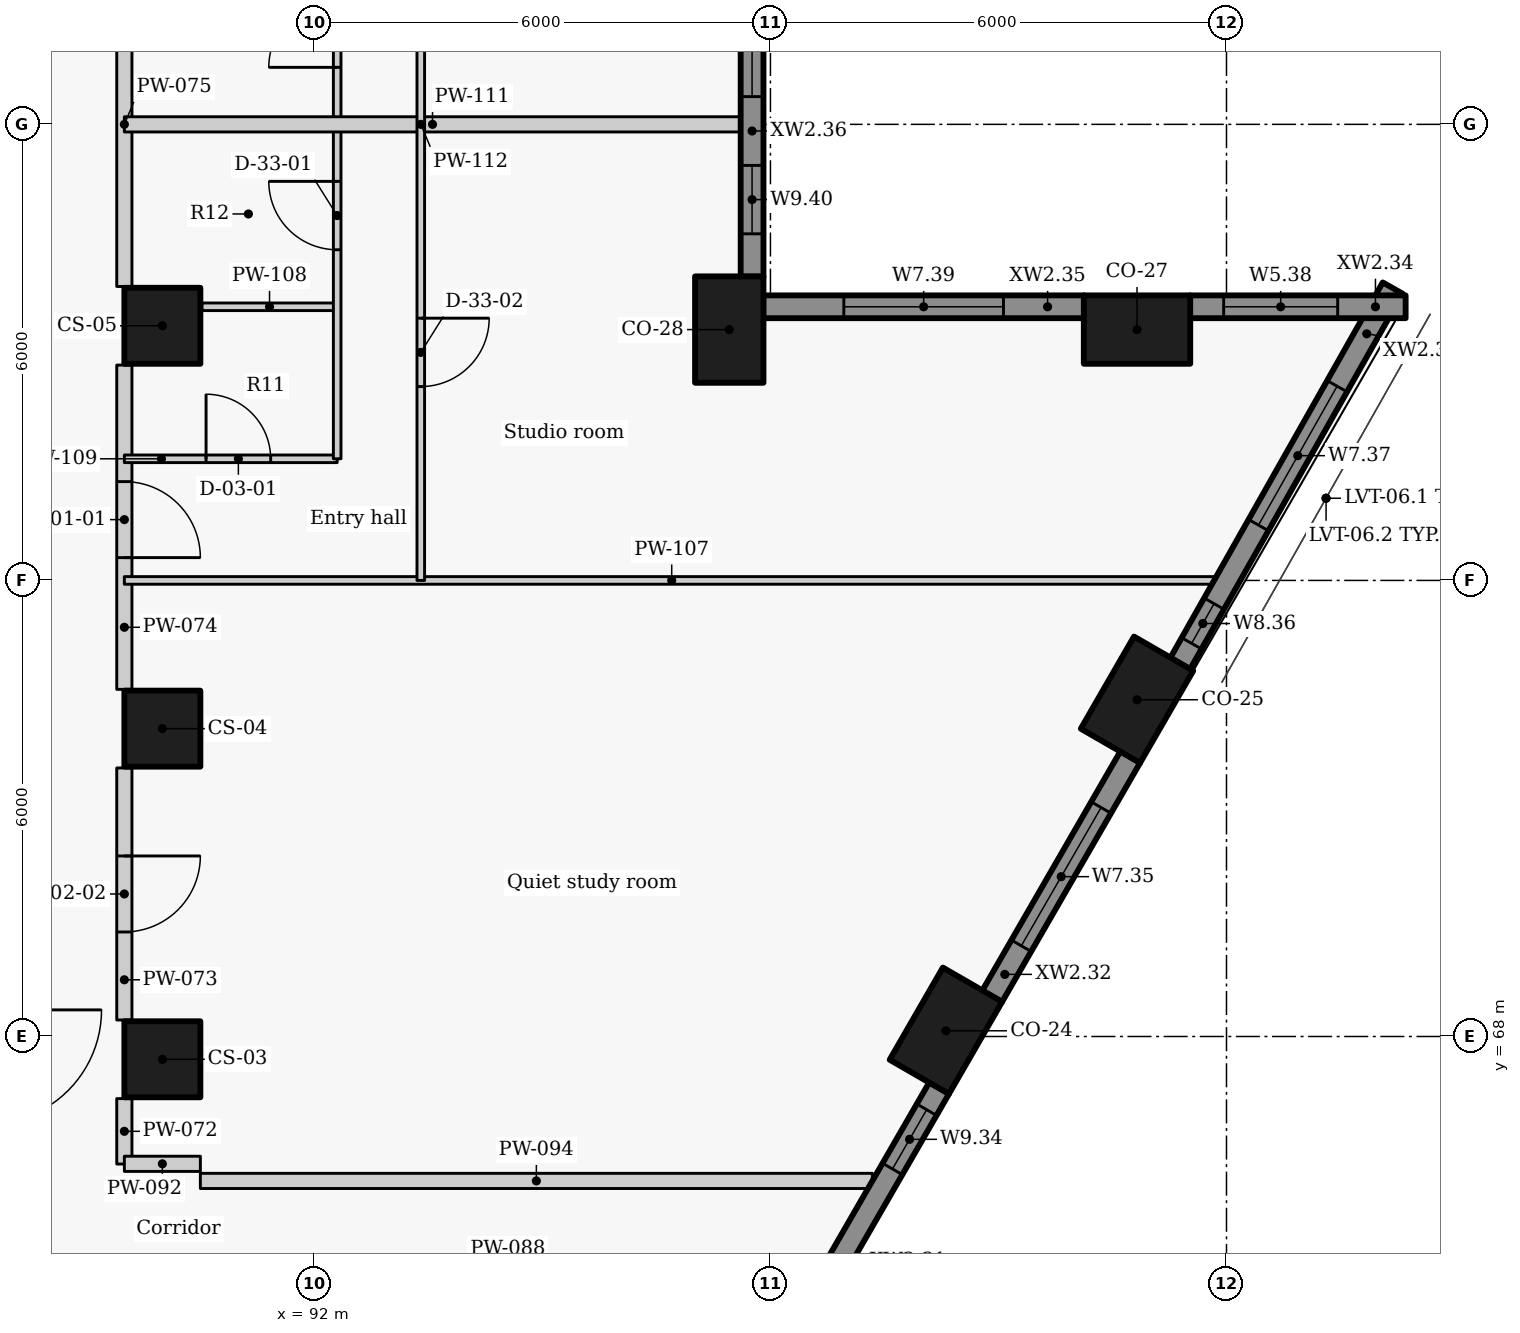
"""IFC4 building model, lengths in metres.
Left out: names, types, materials, properties, quantities, classifications, styles, units other than length and angle.
Written with IfcOpenShell. Run it as: python <this file> out.ifc"""

import sys

from ifc_helpers import new_model, si_unit, direction, frame, frame_2d, origin, origin_2d, place, context, subcontext, project, spatial, rectangle, extrude, element, fill, save


model = new_model("IFC4")
c1 = context("Model", 3, precision=1e-05, world=origin(), true_north=direction((0.0, 1.0)))
c2 = subcontext(c1, "Body", "Model", "MODEL_VIEW")
j1 = project(units=[si_unit("LENGTHUNIT", "METRE"), si_unit("PLANEANGLEUNIT", "RADIAN")], contexts=[c1])
p1 = place(None, origin())
s1 = spatial("IfcSite", under=j1, at=p1, CompositionType="ELEMENT")
p2 = place(p1, origin())
s2 = spatial("IfcBuilding", under=s1, at=p2, CompositionType="ELEMENT")
p3 = place(p2, frame((0.0, 0.0, 87.6)))
s3 = spatial("IfcBuildingStorey", under=s2, at=p3, CompositionType="ELEMENT", Elevation=87.6)
for number, where, z_axis, x_axis in (
    (1, (100.308, 68.075, 0.0), (0.0, 0.0, 1.0), (0.5, 0.866, 0.0)),
    (2, (102.823, 72.43, 0.0), (0.0, 0.0, 1.0), (0.5, 0.866, 0.0)),
    (3, (102.823, 77.3, 0.0), (0.0, 0.0, 1.0), (-1.0, 0.0, 0.0)),
    (4, (97.458, 77.3, 0.0), (0.0, 0.0, 1.0), (0.0, 1.0, 0.0)),
):
    element("IfcColumn", number, at=place(p3, frame(where, z_axis=z_axis, x_axis=x_axis)), inside=s3, PredefinedType="COLUMN", context=c2, shape_type="SweptSolid", body=[
        extrude(rectangle(XDim=1.4, YDim=0.9, at=origin_2d()), origin(), (0.0, 0.0, 1.0), 3.3),
    ])
for number, where, z_axis, x_axis in (
    (5, (90.0, 67.7, 0.0), (0.0, 0.0, 1.0), (0.0, 1.0, 0.0)),
    (6, (90.0, 72.05, 0.0), (0.0, 0.0, 1.0), (0.0, 1.0, 0.0)),
    (7, (90.0, 77.35, 0.0), (0.0, 0.0, 1.0), (0.0, 1.0, 0.0)),
):
    element("IfcColumn", number, at=place(p3, frame(where, z_axis=z_axis, x_axis=x_axis)), inside=s3, PredefinedType="COLUMN", context=c2, shape_type="SweptSolid", body=[
        extrude(rectangle(XDim=1.0, YDim=1.0, at=origin_2d()), origin(), (0.0, 0.0, 1.0), 3.3),
    ])
p4 = place(p3, frame((98.253, 63.916, 0.0), z_axis=(0.0, 0.0, 1.0), x_axis=(0.499957037901, 0.866050206543, 0.0)))
e8 = element("IfcWall", 8, at=p4, inside=s3, PredefinedType="SOLIDWALL", context=c2, shape_type="SweptSolid", body=[
    extrude(rectangle(XDim=3.934, YDim=0.3, at=frame_2d((1.967, 0.0))), origin(), (0.0, 0.0, 1.0), 2.425),
])
p5 = place(p4, frame((2.704, 0.0, 0.9)))
e9 = element("IfcOpeningElement", 9, at=p5, cuts=e8, PredefinedType="OPENING", context=c2, shape_type="SweptSolid", body=[
    extrude(rectangle(XDim=0.9, YDim=1.1, at=frame_2d((0.45, 0.55))), frame((0.0, 0.16, 0.0), z_axis=(0.0, -1.0, 0.0), x_axis=(1.0, 0.0, 0.0)), (0.0, 0.0, 1.0), 0.32),
])
p6 = place(p3, frame((100.916, 68.528, 0.0), z_axis=(0.0, 0.0, 1.0), x_axis=(0.500009139881, 0.866020126807, 0.0)))
e10 = element("IfcWall", 10, at=p6, inside=s3, PredefinedType="SOLIDWALL", context=c2, shape_type="SweptSolid", body=[
    extrude(rectangle(XDim=3.637, YDim=0.3, at=frame_2d((1.818, 0.0))), origin(), (0.0, 0.0, 1.0), 2.425),
])
p7 = place(p6, frame((0.768, 0.0, 0.9)))
e11 = element("IfcOpeningElement", 11, at=p7, cuts=e10, PredefinedType="OPENING", context=c2, shape_type="SweptSolid", body=[
    extrude(rectangle(XDim=2.1, YDim=1.1, at=frame_2d((1.05, 0.55))), frame((0.0, 0.16, 0.0), z_axis=(0.0, -1.0, 0.0), x_axis=(1.0, 0.0, 0.0)), (0.0, 0.0, 1.0), 0.32),
])
p8 = place(p3, frame((103.391, 72.906, 0.0), z_axis=(0.0, 0.0, 1.0), x_axis=(0.492456858874, 0.870336855561, 0.0)))
e12 = element("IfcWall", 12, at=p8, inside=s3, PredefinedType="SOLIDWALL", context=c2, shape_type="SweptSolid", body=[
    extrude(rectangle(XDim=5.677, YDim=0.3, at=frame_2d((2.838, 0.0))), origin(), (0.0, 0.0, 1.0), 2.425),
])
p9 = place(p8, frame((0.305, 0.0, 0.9)))
e13 = element("IfcOpeningElement", 13, at=p9, cuts=e12, PredefinedType="OPENING", context=c2, shape_type="SweptSolid", body=[
    extrude(rectangle(XDim=0.6, YDim=1.1, at=frame_2d((0.3, 0.55))), frame((0.0, 0.16, 0.0), z_axis=(0.0, -1.0, 0.0), x_axis=(1.0, 0.0, 0.0)), (0.0, 0.0, 1.0), 0.32),
])
p10 = place(p8, frame((2.093, 0.0, 0.9)))
e14 = element("IfcOpeningElement", 14, at=p10, cuts=e12, PredefinedType="OPENING", context=c2, shape_type="SweptSolid", body=[
    extrude(rectangle(XDim=2.1, YDim=1.1, at=frame_2d((1.05, 0.55))), frame((0.0, 0.16, 0.0), z_axis=(0.0, -1.0, 0.0), x_axis=(1.0, 0.0, 0.0)), (0.0, 0.0, 1.0), 0.32),
])
p11 = place(p3, frame((106.357, 77.6, 0.0), z_axis=(0.0, 0.0, 1.0), x_axis=(-1.0, 0.0, 0.0)))
e15 = element("IfcWall", 15, at=p11, inside=s3, PredefinedType="SOLIDWALL", context=c2, shape_type="SweptSolid", body=[
    extrude(rectangle(XDim=2.838, YDim=0.3, at=frame_2d((1.419, 0.0))), origin(), (0.0, 0.0, 1.0), 2.425),
])
p12 = place(p11, frame((0.894, 0.0, 0.9)))
e16 = element("IfcOpeningElement", 16, at=p12, cuts=e15, PredefinedType="OPENING", context=c2, shape_type="SweptSolid", body=[
    extrude(rectangle(XDim=1.5, YDim=1.1, at=frame_2d((0.75, 0.55))), frame((0.0, 0.16, 0.0), z_axis=(0.0, -1.0, 0.0), x_axis=(1.0, 0.0, 0.0)), (0.0, 0.0, 1.0), 0.32),
])
p13 = place(p3, frame((102.127, 77.6, 0.0), z_axis=(0.0, 0.0, 1.0), x_axis=(-1.0, 0.0, 0.0)))
e17 = element("IfcWall", 17, at=p13, inside=s3, PredefinedType="SOLIDWALL", context=c2, shape_type="SweptSolid", body=[
    extrude(rectangle(XDim=4.223, YDim=0.3, at=frame_2d((2.111, 0.0))), origin(), (0.0, 0.0, 1.0), 2.425),
])
p14 = place(p13, frame((1.061, 0.0, 0.9)))
e18 = element("IfcOpeningElement", 18, at=p14, cuts=e17, PredefinedType="OPENING", context=c2, shape_type="SweptSolid", body=[
    extrude(rectangle(XDim=2.1, YDim=1.1, at=frame_2d((1.05, 0.55))), frame((0.0, 0.16, 0.0), z_axis=(0.0, -1.0, 0.0), x_axis=(1.0, 0.0, 0.0)), (0.0, 0.0, 1.0), 0.32),
])
p15 = place(p3, frame((97.758, 77.996, 0.0), z_axis=(0.0, 0.0, 1.0), x_axis=(0.0, 1.0, 0.0)))
e19 = element("IfcWall", 19, at=p15, inside=s3, PredefinedType="SOLIDWALL", context=c2, shape_type="SweptSolid", body=[
    extrude(rectangle(XDim=4.258, YDim=0.3, at=frame_2d((2.129, 0.0))), origin(), (0.0, 0.0, 1.0), 2.425),
])
p16 = place(p15, frame((0.564, 0.0, 0.9)))
e20 = element("IfcOpeningElement", 20, at=p16, cuts=e19, PredefinedType="OPENING", context=c2, shape_type="SweptSolid", body=[
    extrude(rectangle(XDim=0.9, YDim=1.1, at=frame_2d((0.45, 0.55))), frame((0.0, 0.16, 0.0), z_axis=(0.0, -1.0, 0.0), x_axis=(1.0, 0.0, 0.0)), (0.0, 0.0, 1.0), 0.32),
])
p17 = place(p15, frame((2.369, 0.0, 0.9)))
e21 = element("IfcOpeningElement", 21, at=p17, cuts=e19, PredefinedType="OPENING", context=c2, shape_type="SweptSolid", body=[
    extrude(rectangle(XDim=1.5, YDim=1.1, at=frame_2d((0.75, 0.55))), frame((0.0, 0.16, 0.0), z_axis=(0.0, -1.0, 0.0), x_axis=(1.0, 0.0, 0.0)), (0.0, 0.0, 1.0), 0.32),
])
p18 = place(p3, frame((89.5, 66.322, 0.0), z_axis=(0.0, 0.0, 1.0), x_axis=(0.0, 1.0, 0.0)))
e22 = element("IfcWall", 22, at=p18, inside=s3, PredefinedType="PARTITIONING", context=c2, shape_type="SweptSolid", body=[
    extrude(rectangle(XDim=0.861, YDim=0.2, at=frame_2d((0.431, 0.0))), origin(), (0.0, 0.0, 1.0), 3.025),
])
p19 = place(p3, frame((89.5, 71.533, 0.0), z_axis=(0.0, 0.0, 1.0), x_axis=(0.0, -1.0, 0.0)))
e23 = element("IfcWall", 23, at=p19, inside=s3, PredefinedType="PARTITIONING", context=c2, shape_type="SweptSolid", body=[
    extrude(rectangle(XDim=3.316, YDim=0.2, at=frame_2d((1.658, 0.0))), origin(), (0.0, 0.0, 1.0), 3.025),
])
p20 = place(p19, frame((1.158, 0.0, 0.0)))
e24 = element("IfcOpeningElement", 24, at=p20, cuts=e23, PredefinedType="OPENING", context=c2, shape_type="SweptSolid", body=[
    extrude(rectangle(XDim=1.0, YDim=2.1, at=frame_2d((0.5, 1.05))), frame((0.0, 0.11, 0.0), z_axis=(0.0, -1.0, 0.0), x_axis=(1.0, 0.0, 0.0)), (0.0, 0.0, 1.0), 0.22),
])
p21 = place(p3, frame((89.5, 76.833, 0.0), z_axis=(0.0, 0.0, 1.0), x_axis=(0.0, -1.0, 0.0)))
e25 = element("IfcWall", 25, at=p21, inside=s3, PredefinedType="PARTITIONING", context=c2, shape_type="SweptSolid", body=[
    extrude(rectangle(XDim=4.266, YDim=0.2, at=frame_2d((2.133, 0.0))), origin(), (0.0, 0.0, 1.0), 3.025),
])
p22 = place(p21, frame((1.533, 0.0, 0.0)))
e26 = element("IfcOpeningElement", 26, at=p22, cuts=e25, PredefinedType="OPENING", context=c2, shape_type="SweptSolid", body=[
    extrude(rectangle(XDim=1.0, YDim=2.1, at=frame_2d((0.5, 1.05))), frame((0.0, 0.11, 0.0), z_axis=(0.0, -1.0, 0.0), x_axis=(1.0, 0.0, 0.0)), (0.0, 0.0, 1.0), 0.22),
])
p23 = place(p3, frame((89.5, 77.867, 0.0), z_axis=(0.0, 0.0, 1.0), x_axis=(0.0, 1.0, 0.0)))
e27 = element("IfcWall", 27, at=p23, inside=s3, PredefinedType="PARTITIONING", context=c2, shape_type="SweptSolid", body=[
    extrude(rectangle(XDim=4.266, YDim=0.2, at=frame_2d((2.133, 0.0))), origin(), (0.0, 0.0, 1.0), 3.025),
])
p24 = place(p3, frame((89.5, 66.325, 0.0), z_axis=(0.0, 0.0, 1.0), x_axis=(1.0, 0.0, 0.0)))
e28 = element("IfcWall", 28, at=p24, inside=s3, PredefinedType="PARTITIONING", context=c2, shape_type="SweptSolid", body=[
    extrude(rectangle(XDim=1.0, YDim=0.2, at=frame_2d((0.5, 0.0))), origin(), (0.0, 0.0, 1.0), 2.505),
])
p25 = place(p3, frame((90.5, 66.1, 0.0), z_axis=(0.0, 0.0, 1.0), x_axis=(1.0, 0.0, 0.0)))
e29 = element("IfcWall", 29, at=p25, inside=s3, PredefinedType="PARTITIONING", context=c2, shape_type="SweptSolid", body=[
    extrude(rectangle(XDim=8.841, YDim=0.2, at=frame_2d((4.421, 0.0))), origin(), (0.0, 0.0, 1.0), 2.405),
])
p26 = place(p3, frame((89.5, 74.0, 0.0), z_axis=(0.0, 0.0, 1.0), x_axis=(1.0, 0.0, 0.0)))
e30 = element("IfcWall", 30, at=p26, inside=s3, PredefinedType="PARTITIONING", context=c2, shape_type="SweptSolid", body=[
    extrude(rectangle(XDim=14.402, YDim=0.1, at=frame_2d((7.201, 0.0))), origin(), (0.0, 0.0, 1.0), 2.405),
])
p27 = place(p3, frame((90.52, 77.6, 0.0), z_axis=(0.0, 0.0, 1.0), x_axis=(1.0, 0.0, 0.0)))
e31 = element("IfcWall", 31, at=p27, inside=s3, PredefinedType="PARTITIONING", context=c2, shape_type="SweptSolid", body=[
    extrude(rectangle(XDim=1.78, YDim=0.1, at=frame_2d((0.89, 0.0))), origin(), (0.0, 0.0, 1.0), 3.025),
])
p28 = place(p3, frame((89.5, 75.6, 0.0), z_axis=(0.0, 0.0, 1.0), x_axis=(1.0, 0.0, 0.0)))
e32 = element("IfcWall", 32, at=p28, inside=s3, PredefinedType="PARTITIONING", context=c2, shape_type="SweptSolid", body=[
    extrude(rectangle(XDim=2.8, YDim=0.1, at=frame_2d((1.4, 0.0))), origin(), (0.0, 0.0, 1.0), 2.505),
])
p29 = place(p28, frame((1.075, 0.0, 0.0)))
e33 = element("IfcOpeningElement", 33, at=p29, cuts=e32, PredefinedType="OPENING", context=c2, shape_type="SweptSolid", body=[
    extrude(rectangle(XDim=0.85, YDim=2.1, at=frame_2d((0.425, 1.05))), frame((0.0, 0.06, 0.0), z_axis=(0.0, -1.0, 0.0), x_axis=(1.0, 0.0, 0.0)), (0.0, 0.0, 1.0), 0.12),
])
p30 = place(p3, frame((92.3, 75.6, 0.0), z_axis=(0.0, 0.0, 1.0), x_axis=(0.0, 1.0, 0.0)))
e34 = element("IfcWall", 34, at=p30, inside=s3, PredefinedType="PARTITIONING", context=c2, shape_type="SweptSolid", body=[
    extrude(rectangle(XDim=8.8, YDim=0.1, at=frame_2d((4.4, 0.0))), origin(), (0.0, 0.0, 1.0), 3.025),
])
p31 = place(p30, frame((2.75, 0.0, 0.0)))
e35 = element("IfcOpeningElement", 35, at=p31, cuts=e34, PredefinedType="OPENING", context=c2, shape_type="SweptSolid", body=[
    extrude(rectangle(XDim=0.9, YDim=2.1, at=frame_2d((0.45, 1.05))), frame((0.0, 0.06, 0.0), z_axis=(0.0, -1.0, 0.0), x_axis=(1.0, 0.0, 0.0)), (0.0, 0.0, 1.0), 0.12),
])
p32 = place(p30, frame((5.15, 0.0, 0.0)))
e36 = element("IfcOpeningElement", 36, at=p32, cuts=e34, PredefinedType="OPENING", context=c2, shape_type="SweptSolid", body=[
    extrude(rectangle(XDim=0.9, YDim=2.1, at=frame_2d((0.45, 1.05))), frame((0.0, 0.06, 0.0), z_axis=(0.0, -1.0, 0.0), x_axis=(1.0, 0.0, 0.0)), (0.0, 0.0, 1.0), 0.12),
])
p33 = place(p3, frame((89.5, 80.0, 0.0), z_axis=(0.0, 0.0, 1.0), x_axis=(1.0, 0.0, 0.0)))
e37 = element("IfcWall", 37, at=p33, inside=s3, PredefinedType="PARTITIONING", context=c2, shape_type="SweptSolid", body=[
    extrude(rectangle(XDim=8.108, YDim=0.2, at=frame_2d((4.054, 0.0))), origin(), (0.0, 0.0, 1.0), 2.405),
])
p34 = place(p3, frame((93.4, 86.0, 0.0), z_axis=(0.0, 0.0, 1.0), x_axis=(0.0, -1.0, 0.0)))
e38 = element("IfcWall", 38, at=p34, inside=s3, PredefinedType="PARTITIONING", context=c2, shape_type="SweptSolid", body=[
    extrude(rectangle(XDim=12.0, YDim=0.1, at=frame_2d((6.0, 0.0))), origin(), (0.0, 0.0, 1.0), 3.025),
])
p35 = place(p34, frame((8.55, 0.0, 0.0)))
e39 = element("IfcOpeningElement", 39, at=p35, cuts=e38, PredefinedType="OPENING", context=c2, shape_type="SweptSolid", body=[
    extrude(rectangle(XDim=0.9, YDim=2.1, at=frame_2d((0.45, 1.05))), frame((0.0, 0.06, 0.0), z_axis=(0.0, -1.0, 0.0), x_axis=(1.0, 0.0, 0.0)), (0.0, 0.0, 1.0), 0.12),
])
p36 = place(p34, frame((2.55, 0.0, 0.0)))
e40 = element("IfcOpeningElement", 40, at=p36, cuts=e38, PredefinedType="OPENING", context=c2, shape_type="SweptSolid", body=[
    extrude(rectangle(XDim=0.9, YDim=2.1, at=frame_2d((0.45, 1.05))), frame((0.0, 0.06, 0.0), z_axis=(0.0, -1.0, 0.0), x_axis=(1.0, 0.0, 0.0)), (0.0, 0.0, 1.0), 0.12),
])
p37 = place(p5, origin())
e41 = element("IfcWindow", 41, at=p37, inside=s3, PartitioningType="SINGLE_PANEL", PredefinedType="WINDOW", context=c2, shape_type="SweptSolid", body=[
    extrude(rectangle(XDim=0.9, YDim=1.1, at=frame_2d((0.45, 0.55))), frame((0.0, 0.03, 0.0), z_axis=(0.0, -1.0, 0.0), x_axis=(1.0, 0.0, 0.0)), (0.0, 0.0, 1.0), 0.06),
])
fill(e9, e41)
p38 = place(p7, origin())
e42 = element("IfcWindow", 42, at=p38, inside=s3, PartitioningType="SINGLE_PANEL", PredefinedType="WINDOW", context=c2, shape_type="SweptSolid", body=[
    extrude(rectangle(XDim=2.1, YDim=1.1, at=frame_2d((1.05, 0.55))), frame((0.0, 0.03, 0.0), z_axis=(0.0, -1.0, 0.0), x_axis=(1.0, 0.0, 0.0)), (0.0, 0.0, 1.0), 0.06),
])
fill(e11, e42)
p39 = place(p9, origin())
e43 = element("IfcWindow", 43, at=p39, inside=s3, PartitioningType="SINGLE_PANEL", PredefinedType="WINDOW", context=c2, shape_type="SweptSolid", body=[
    extrude(rectangle(XDim=0.6, YDim=1.1, at=frame_2d((0.3, 0.55))), frame((0.0, 0.03, 0.0), z_axis=(0.0, -1.0, 0.0), x_axis=(1.0, 0.0, 0.0)), (0.0, 0.0, 1.0), 0.06),
])
fill(e13, e43)
p40 = place(p10, origin())
e44 = element("IfcWindow", 44, at=p40, inside=s3, PartitioningType="SINGLE_PANEL", PredefinedType="WINDOW", context=c2, shape_type="SweptSolid", body=[
    extrude(rectangle(XDim=2.1, YDim=1.1, at=frame_2d((1.05, 0.55))), frame((0.0, 0.03, 0.0), z_axis=(0.0, -1.0, 0.0), x_axis=(1.0, 0.0, 0.0)), (0.0, 0.0, 1.0), 0.06),
])
fill(e14, e44)
p41 = place(p12, origin())
e45 = element("IfcWindow", 45, at=p41, inside=s3, PartitioningType="SINGLE_PANEL", PredefinedType="WINDOW", context=c2, shape_type="SweptSolid", body=[
    extrude(rectangle(XDim=1.5, YDim=1.1, at=frame_2d((0.75, 0.55))), frame((0.0, 0.03, 0.0), z_axis=(0.0, -1.0, 0.0), x_axis=(1.0, 0.0, 0.0)), (0.0, 0.0, 1.0), 0.06),
])
fill(e16, e45)
p42 = place(p14, origin())
e46 = element("IfcWindow", 46, at=p42, inside=s3, PartitioningType="SINGLE_PANEL", PredefinedType="WINDOW", context=c2, shape_type="SweptSolid", body=[
    extrude(rectangle(XDim=2.1, YDim=1.1, at=frame_2d((1.05, 0.55))), frame((0.0, 0.03, 0.0), z_axis=(0.0, -1.0, 0.0), x_axis=(1.0, 0.0, 0.0)), (0.0, 0.0, 1.0), 0.06),
])
fill(e18, e46)
p43 = place(p16, origin())
e47 = element("IfcWindow", 47, at=p43, inside=s3, PartitioningType="SINGLE_PANEL", PredefinedType="WINDOW", context=c2, shape_type="SweptSolid", body=[
    extrude(rectangle(XDim=0.9, YDim=1.1, at=frame_2d((0.45, 0.55))), frame((0.0, 0.03, 0.0), z_axis=(0.0, -1.0, 0.0), x_axis=(1.0, 0.0, 0.0)), (0.0, 0.0, 1.0), 0.06),
])
fill(e20, e47)
p44 = place(p17, origin())
e48 = element("IfcWindow", 48, at=p44, inside=s3, PartitioningType="SINGLE_PANEL", PredefinedType="WINDOW", context=c2, shape_type="SweptSolid", body=[
    extrude(rectangle(XDim=1.5, YDim=1.1, at=frame_2d((0.75, 0.55))), frame((0.0, 0.03, 0.0), z_axis=(0.0, -1.0, 0.0), x_axis=(1.0, 0.0, 0.0)), (0.0, 0.0, 1.0), 0.06),
])
fill(e21, e48)
p45 = place(p20, origin())
e49 = element("IfcDoor", 49, at=p45, inside=s3, OperationType="SINGLE_SWING_LEFT", PredefinedType="DOOR", context=c2, shape_type="SweptSolid", body=[
    extrude(rectangle(XDim=1.0, YDim=2.1, at=frame_2d((0.5, 1.05))), frame((0.0, 0.025, 0.0), z_axis=(0.0, -1.0, 0.0), x_axis=(1.0, 0.0, 0.0)), (0.0, 0.0, 1.0), 0.05),
])
fill(e24, e49)
p46 = place(p22, origin())
e50 = element("IfcDoor", 50, at=p46, inside=s3, OperationType="SINGLE_SWING_RIGHT", PredefinedType="DOOR", context=c2, shape_type="SweptSolid", body=[
    extrude(rectangle(XDim=1.0, YDim=2.1, at=frame_2d((0.5, 1.05))), frame((0.0, 0.025, 0.0), z_axis=(0.0, -1.0, 0.0), x_axis=(1.0, 0.0, 0.0)), (0.0, 0.0, 1.0), 0.05),
])
fill(e26, e50)
p47 = place(p29, origin())
e51 = element("IfcDoor", 51, at=p47, inside=s3, OperationType="SINGLE_SWING_LEFT", PredefinedType="DOOR", context=c2, shape_type="SweptSolid", body=[
    extrude(rectangle(XDim=0.85, YDim=2.1, at=frame_2d((0.425, 1.05))), frame((0.0, 0.025, 0.0), z_axis=(0.0, -1.0, 0.0), x_axis=(1.0, 0.0, 0.0)), (0.0, 0.0, 1.0), 0.05),
])
fill(e33, e51)
p48 = place(p31, origin())
e52 = element("IfcDoor", 52, at=p48, inside=s3, OperationType="SINGLE_SWING_RIGHT", PredefinedType="DOOR", context=c2, shape_type="SweptSolid", body=[
    extrude(rectangle(XDim=0.9, YDim=2.1, at=frame_2d((0.45, 1.05))), frame((0.0, 0.025, 0.0), z_axis=(0.0, -1.0, 0.0), x_axis=(1.0, 0.0, 0.0)), (0.0, 0.0, 1.0), 0.05),
])
fill(e35, e52)
p49 = place(p35, origin())
e53 = element("IfcDoor", 53, at=p49, inside=s3, OperationType="SINGLE_SWING_LEFT", PredefinedType="DOOR", context=c2, shape_type="SweptSolid", body=[
    extrude(rectangle(XDim=0.9, YDim=2.1, at=frame_2d((0.45, 1.05))), frame((0.0, 0.025, 0.0), z_axis=(0.0, -1.0, 0.0), x_axis=(1.0, 0.0, 0.0)), (0.0, 0.0, 1.0), 0.05),
])
fill(e39, e53)
p50 = place(p32, origin())
e54 = element("IfcDoor", 54, at=p50, inside=s3, OperationType="SINGLE_SWING_LEFT", PredefinedType="DOOR", context=c2, shape_type="SweptSolid", body=[
    extrude(rectangle(XDim=0.9, YDim=2.1, at=frame_2d((0.45, 1.05))), frame((0.0, 0.025, 0.0), z_axis=(0.0, -1.0, 0.0), x_axis=(1.0, 0.0, 0.0)), (0.0, 0.0, 1.0), 0.05),
])
fill(e36, e54)
save(model, sys.argv[1])
